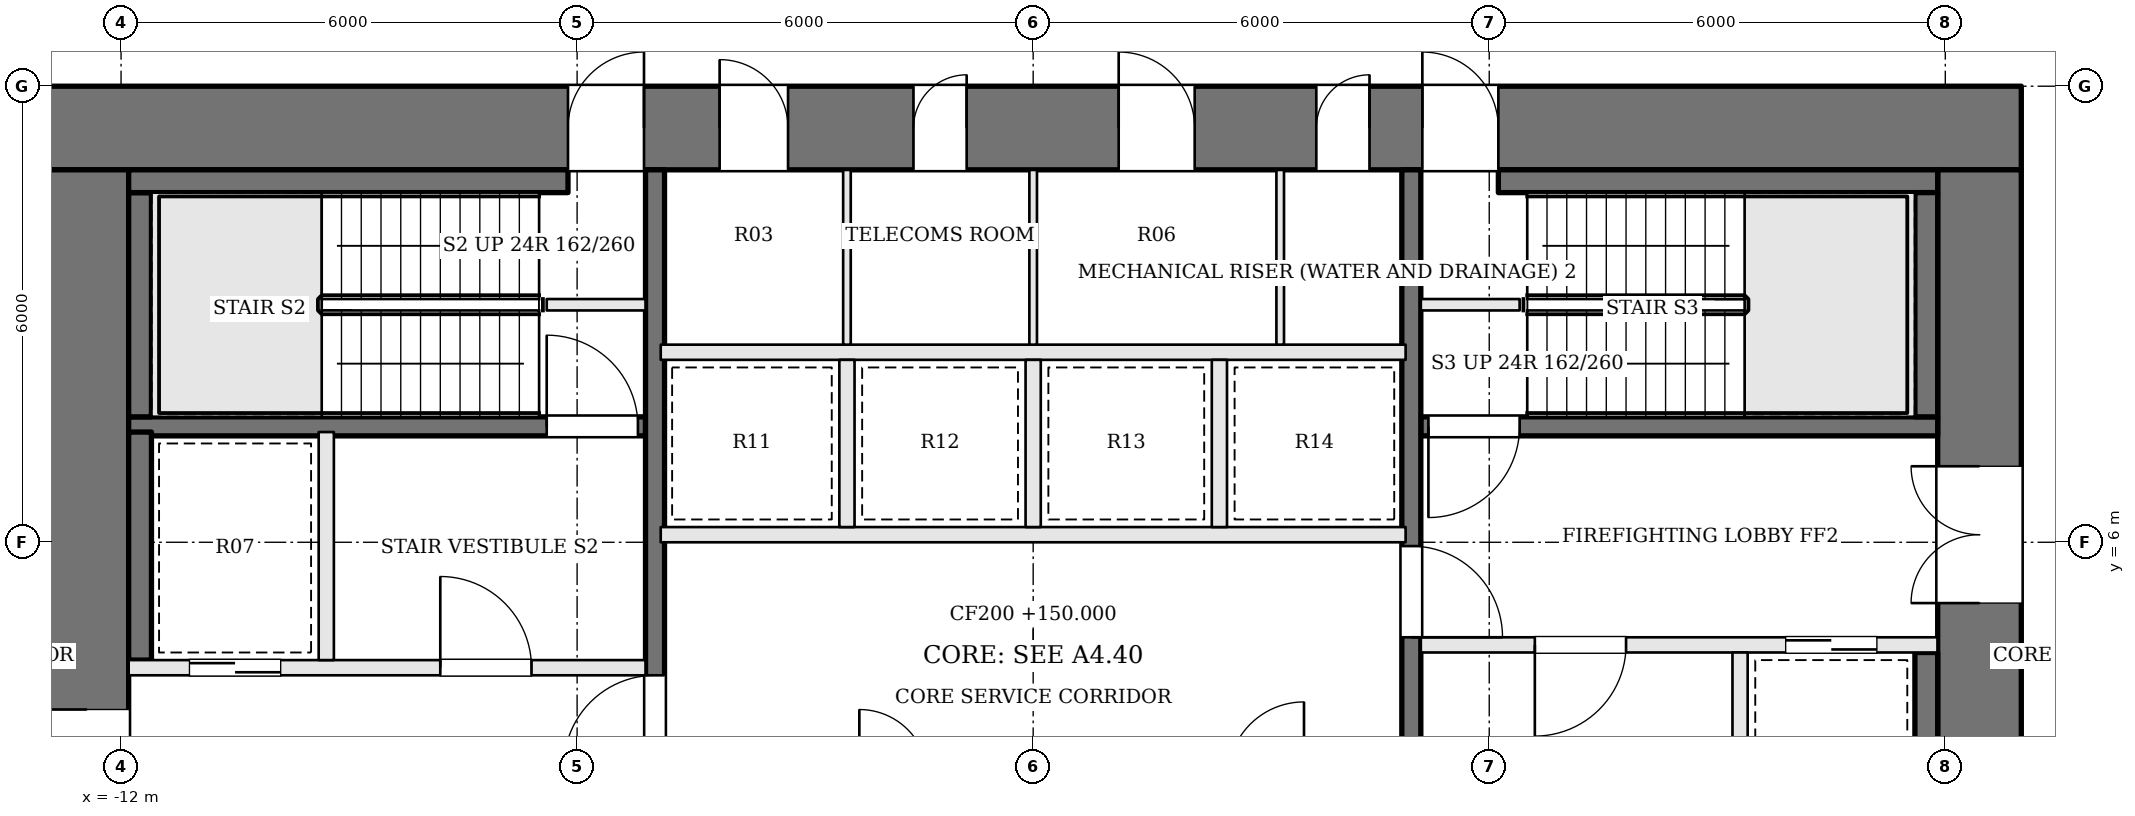
"""IFC4 building model, lengths in metres.
Left out: names, types, materials, properties, quantities, classifications, styles, units other than length and angle.
Written with IfcOpenShell. Run it as: python <this file> out.ifc"""

import sys

from ifc_helpers import new_model, si_unit, direction, frame, frame_2d, origin, place, context, subcontext, project, spatial, rectangle, extrude, element, fill, save


model = new_model("IFC4")
c1 = context("Model", 3, precision=1e-05, world=origin(), true_north=direction((0.0, 1.0)))
c2 = subcontext(c1, "Body", "Model", "MODEL_VIEW")
j1 = project(units=[si_unit("LENGTHUNIT", "METRE"), si_unit("PLANEANGLEUNIT", "RADIAN")], contexts=[c1])
p1 = place(None, origin())
s1 = spatial("IfcSite", under=j1, at=p1, CompositionType="ELEMENT")
p2 = place(p1, origin())
s2 = spatial("IfcBuilding", under=s1, at=p2, CompositionType="ELEMENT")
p3 = place(p2, frame((0.0, 0.0, 150.0)))
s3 = spatial("IfcBuildingStorey", under=s2, at=p3, CompositionType="ELEMENT", Elevation=150.0)
p4 = place(p3, frame((-13.0, 11.45, 0.0), z_axis=(0.0, 0.0, 1.0), x_axis=(1.0, 0.0, 0.0)))
e1 = element("IfcWall", 1, at=p4, inside=s3, PredefinedType="SHEAR", context=c2, shape_type="SweptSolid", body=[
    extrude(rectangle(XDim=26.0, YDim=1.1, at=frame_2d((13.0, 0.0))), origin(), (0.0, 0.0, 1.0), 3.9),
])
p5 = place(p4, frame((8.875, 0.0, 0.0)))
e2 = element("IfcOpeningElement", 2, at=p5, cuts=e1, PredefinedType="OPENING", context=c2, shape_type="SweptSolid", body=[
    extrude(rectangle(XDim=0.9, YDim=2.1, at=frame_2d((0.45, 1.05))), frame((0.0, 0.56, 0.0), z_axis=(0.0, -1.0, 0.0), x_axis=(1.0, 0.0, 0.0)), (0.0, 0.0, 1.0), 1.12),
])
p6 = place(p4, frame((11.425, 0.0, 0.0)))
e3 = element("IfcOpeningElement", 3, at=p6, cuts=e1, PredefinedType="OPENING", context=c2, shape_type="SweptSolid", body=[
    extrude(rectangle(XDim=0.7, YDim=2.1, at=frame_2d((0.35, 1.05))), frame((0.0, 0.56, 0.0), z_axis=(0.0, -1.0, 0.0), x_axis=(1.0, 0.0, 0.0)), (0.0, 0.0, 1.0), 1.12),
])
p7 = place(p4, frame((14.125, 0.0, 0.0)))
e4 = element("IfcOpeningElement", 4, at=p7, cuts=e1, PredefinedType="OPENING", context=c2, shape_type="SweptSolid", body=[
    extrude(rectangle(XDim=1.0, YDim=2.1, at=frame_2d((0.5, 1.05))), frame((0.0, 0.56, 0.0), z_axis=(0.0, -1.0, 0.0), x_axis=(1.0, 0.0, 0.0)), (0.0, 0.0, 1.0), 1.12),
])
p8 = place(p4, frame((16.725, 0.0, 0.0)))
e5 = element("IfcOpeningElement", 5, at=p8, cuts=e1, PredefinedType="OPENING", context=c2, shape_type="SweptSolid", body=[
    extrude(rectangle(XDim=0.7, YDim=2.1, at=frame_2d((0.35, 1.05))), frame((0.0, 0.56, 0.0), z_axis=(0.0, -1.0, 0.0), x_axis=(1.0, 0.0, 0.0)), (0.0, 0.0, 1.0), 1.12),
])
p9 = place(p4, frame((6.88, 0.0, 0.0)))
e6 = element("IfcOpeningElement", 6, at=p9, cuts=e1, PredefinedType="OPENING", context=c2, shape_type="SweptSolid", body=[
    extrude(rectangle(XDim=1.0, YDim=2.1, at=frame_2d((0.5, 1.05))), frame((0.0, 0.56, 0.0), z_axis=(0.0, -1.0, 0.0), x_axis=(1.0, 0.0, 0.0)), (0.0, 0.0, 1.0), 1.12),
])
p10 = place(p4, frame((18.12, 0.0, 0.0)))
e7 = element("IfcOpeningElement", 7, at=p10, cuts=e1, PredefinedType="OPENING", context=c2, shape_type="SweptSolid", body=[
    extrude(rectangle(XDim=1.0, YDim=2.1, at=frame_2d((0.5, 1.05))), frame((0.0, 0.56, 0.0), z_axis=(0.0, -1.0, 0.0), x_axis=(1.0, 0.0, 0.0)), (0.0, 0.0, 1.0), 1.12),
])
p11 = place(p3, frame((12.45, -1.9, 0.0), z_axis=(0.0, 0.0, 1.0), x_axis=(0.0, 1.0, 0.0)))
e8 = element("IfcWall", 8, at=p11, inside=s3, PredefinedType="SHEAR", context=c2, shape_type="SweptSolid", body=[
    extrude(rectangle(XDim=12.8, YDim=1.1, at=frame_2d((6.4, 0.0))), origin(), (0.0, 0.0, 1.0), 3.9),
])
p12 = place(p11, frame((7.1, 0.0, 0.0)))
e9 = element("IfcOpeningElement", 9, at=p12, cuts=e8, PredefinedType="OPENING", context=c2, shape_type="SweptSolid", body=[
    extrude(rectangle(XDim=1.8, YDim=2.1, at=frame_2d((0.9, 1.05))), frame((0.0, 0.56, 0.0), z_axis=(0.0, -1.0, 0.0), x_axis=(1.0, 0.0, 0.0)), (0.0, 0.0, 1.0), 1.12),
])
p13 = place(p3, frame((-12.45, -1.9, 0.0), z_axis=(0.0, 0.0, 1.0), x_axis=(0.0, 1.0, 0.0)))
e10 = element("IfcWall", 10, at=p13, inside=s3, PredefinedType="SHEAR", context=c2, shape_type="SweptSolid", body=[
    extrude(rectangle(XDim=12.8, YDim=1.1, at=frame_2d((6.4, 0.0))), origin(), (0.0, 0.0, 1.0), 3.9),
])
p14 = place(p13, frame((3.9, 0.0, 0.0)))
e11 = element("IfcOpeningElement", 11, at=p14, cuts=e10, PredefinedType="OPENING", context=c2, shape_type="SweptSolid", body=[
    extrude(rectangle(XDim=1.8, YDim=2.1, at=frame_2d((0.9, 1.05))), frame((0.0, 0.56, 0.0), z_axis=(0.0, -1.0, 0.0), x_axis=(1.0, 0.0, 0.0)), (0.0, 0.0, 1.0), 1.12),
])
for number, where, z_axis, x_axis in (
    (12, (6.4, 9.125, 0.0), (0.0, 0.0, 1.0), (-1.0, 0.0, 0.0)),
    (13, (-6.4, 9.125, 0.0), (0.0, 0.0, 1.0), (1.0, 0.0, 0.0)),
):
    element("IfcWall", number, at=place(p3, frame(where, z_axis=z_axis, x_axis=x_axis)), inside=s3, PredefinedType="SOLIDWALL", context=c2, shape_type="SweptSolid", body=[
        extrude(rectangle(XDim=1.3, YDim=0.15, at=frame_2d((0.65, 0.0))), origin(), (0.0, 0.0, 1.0), 3.7),
    ])
p15 = place(p3, frame((11.9, 7.525, 0.0), z_axis=(0.0, 0.0, 1.0), x_axis=(-1.0, 0.0, 0.0)))
e14 = element("IfcWall", 14, at=p15, inside=s3, PredefinedType="SOLIDWALL", context=c2, shape_type="SweptSolid", body=[
    extrude(rectangle(XDim=6.8, YDim=0.25, at=frame_2d((3.4, 0.0))), origin(), (0.0, 0.0, 1.0), 3.7),
])
p16 = place(p15, frame((5.5, 0.0, 0.0)))
e15 = element("IfcOpeningElement", 15, at=p16, cuts=e14, PredefinedType="OPENING", context=c2, shape_type="SweptSolid", body=[
    extrude(rectangle(XDim=1.2, YDim=2.1, at=frame_2d((0.6, 1.05))), frame((0.0, 0.135, 0.0), z_axis=(0.0, -1.0, 0.0), x_axis=(1.0, 0.0, 0.0)), (0.0, 0.0, 1.0), 0.27),
])
p17 = place(p3, frame((-11.9, 4.35, 0.0), z_axis=(0.0, 0.0, 1.0), x_axis=(1.0, 0.0, 0.0)))
e16 = element("IfcWall", 16, at=p17, inside=s3, PredefinedType="SOLIDWALL", context=c2, shape_type="SweptSolid", body=[
    extrude(rectangle(XDim=6.8, YDim=0.2, at=frame_2d((3.4, 0.0))), origin(), (0.0, 0.0, 1.0), 3.7),
])
p18 = place(p17, frame((4.1, 0.0, 0.0)))
e17 = element("IfcOpeningElement", 17, at=p18, cuts=e16, PredefinedType="OPENING", context=c2, shape_type="SweptSolid", body=[
    extrude(rectangle(XDim=1.2, YDim=2.1, at=frame_2d((0.6, 1.05))), frame((0.0, 0.11, 0.0), z_axis=(0.0, -1.0, 0.0), x_axis=(1.0, 0.0, 0.0)), (0.0, 0.0, 1.0), 0.22),
])
p19 = place(p17, frame((0.8, 0.0, 0.0)))
e18 = element("IfcOpeningElement", 18, at=p19, cuts=e16, PredefinedType="OPENING", context=c2, shape_type="SweptSolid", body=[
    extrude(rectangle(XDim=1.2, YDim=2.1, at=frame_2d((0.6, 1.05))), frame((0.0, 0.11, 0.0), z_axis=(0.0, -1.0, 0.0), x_axis=(1.0, 0.0, 0.0)), (0.0, 0.0, 1.0), 0.22),
])
p20 = place(p3, frame((11.9, 4.65, 0.0), z_axis=(0.0, 0.0, 1.0), x_axis=(-1.0, 0.0, 0.0)))
e19 = element("IfcWall", 19, at=p20, inside=s3, PredefinedType="SOLIDWALL", context=c2, shape_type="SweptSolid", body=[
    extrude(rectangle(XDim=6.8, YDim=0.2, at=frame_2d((3.4, 0.0))), origin(), (0.0, 0.0, 1.0), 3.7),
])
p21 = place(p20, frame((4.1, 0.0, 0.0)))
e20 = element("IfcOpeningElement", 20, at=p21, cuts=e19, PredefinedType="OPENING", context=c2, shape_type="SweptSolid", body=[
    extrude(rectangle(XDim=1.2, YDim=2.1, at=frame_2d((0.6, 1.05))), frame((0.0, 0.11, 0.0), z_axis=(0.0, -1.0, 0.0), x_axis=(1.0, 0.0, 0.0)), (0.0, 0.0, 1.0), 0.22),
])
p22 = place(p20, frame((0.8, 0.0, 0.0)))
e21 = element("IfcOpeningElement", 21, at=p22, cuts=e19, PredefinedType="OPENING", context=c2, shape_type="SweptSolid", body=[
    extrude(rectangle(XDim=1.2, YDim=2.1, at=frame_2d((0.6, 1.05))), frame((0.0, 0.11, 0.0), z_axis=(0.0, -1.0, 0.0), x_axis=(1.0, 0.0, 0.0)), (0.0, 0.0, 1.0), 0.22),
])
p23 = place(p3, frame((-11.9, 7.525, 0.0), z_axis=(0.0, 0.0, 1.0), x_axis=(1.0, 0.0, 0.0)))
e22 = element("IfcWall", 22, at=p23, inside=s3, PredefinedType="SOLIDWALL", context=c2, shape_type="SweptSolid", body=[
    extrude(rectangle(XDim=6.8, YDim=0.25, at=frame_2d((3.4, 0.0))), origin(), (0.0, 0.0, 1.0), 3.7),
])
p24 = place(p23, frame((5.5, 0.0, 0.0)))
e23 = element("IfcOpeningElement", 23, at=p24, cuts=e22, PredefinedType="OPENING", context=c2, shape_type="SweptSolid", body=[
    extrude(rectangle(XDim=1.2, YDim=2.1, at=frame_2d((0.6, 1.05))), frame((0.0, 0.135, 0.0), z_axis=(0.0, -1.0, 0.0), x_axis=(1.0, 0.0, 0.0)), (0.0, 0.0, 1.0), 0.27),
])
for number, where, z_axis, x_axis in (
    (24, (-9.3, 4.45, 0.0), (0.0, 0.0, 1.0), (0.0, 1.0, 0.0)),
    (25, (9.3, 4.55, 0.0), (0.0, 0.0, 1.0), (0.0, -1.0, 0.0)),
):
    element("IfcWall", number, at=place(p3, frame(where, z_axis=z_axis, x_axis=x_axis)), inside=s3, PredefinedType="SOLIDWALL", context=c2, shape_type="SweptSolid", body=[
        extrude(rectangle(XDim=3.0, YDim=0.2, at=frame_2d((1.5, 0.0))), origin(), (0.0, 0.0, 1.0), 3.7),
    ])
p25 = place(p3, frame((-4.975, -1.9, 0.0), z_axis=(0.0, 0.0, 1.0), x_axis=(0.0, 1.0, 0.0)))
e26 = element("IfcWall", 26, at=p25, inside=s3, PredefinedType="SOLIDWALL", context=c2, shape_type="SweptSolid", body=[
    extrude(rectangle(XDim=12.8, YDim=0.25, at=frame_2d((6.4, 0.0))), origin(), (0.0, 0.0, 1.0), 3.7),
])
p26 = place(p25, frame((4.95, 0.0, 0.0)))
e27 = element("IfcOpeningElement", 27, at=p26, cuts=e26, PredefinedType="OPENING", context=c2, shape_type="SweptSolid", body=[
    extrude(rectangle(XDim=1.2, YDim=2.1, at=frame_2d((0.6, 1.05))), frame((0.0, 0.135, 0.0), z_axis=(0.0, -1.0, 0.0), x_axis=(1.0, 0.0, 0.0)), (0.0, 0.0, 1.0), 0.27),
])
p27 = place(p3, frame((4.975, 10.9, 0.0), z_axis=(0.0, 0.0, 1.0), x_axis=(0.0, -1.0, 0.0)))
e28 = element("IfcWall", 28, at=p27, inside=s3, PredefinedType="SOLIDWALL", context=c2, shape_type="SweptSolid", body=[
    extrude(rectangle(XDim=12.8, YDim=0.25, at=frame_2d((6.4, 0.0))), origin(), (0.0, 0.0, 1.0), 3.7),
])
p28 = place(p27, frame((4.95, 0.0, 0.0)))
e29 = element("IfcOpeningElement", 29, at=p28, cuts=e28, PredefinedType="OPENING", context=c2, shape_type="SweptSolid", body=[
    extrude(rectangle(XDim=1.2, YDim=2.1, at=frame_2d((0.6, 1.05))), frame((0.0, 0.135, 0.0), z_axis=(0.0, -1.0, 0.0), x_axis=(1.0, 0.0, 0.0)), (0.0, 0.0, 1.0), 0.27),
])
p29 = place(p3, frame((-11.75, 4.45, 0.0), z_axis=(0.0, 0.0, 1.0), x_axis=(0.0, 1.0, 0.0)))
e30 = element("IfcWall", 30, at=p29, inside=s3, PredefinedType="SOLIDWALL", context=c2, shape_type="SweptSolid", body=[
    extrude(rectangle(XDim=3.0, YDim=0.3, at=frame_2d((1.5, 0.0))), origin(), (0.0, 0.0, 1.0), 3.7),
])
p30 = place(p3, frame((-11.75, 7.65, 0.0), z_axis=(0.0, 0.0, 1.0), x_axis=(0.0, 1.0, 0.0)))
e31 = element("IfcWall", 31, at=p30, inside=s3, PredefinedType="SOLIDWALL", context=c2, shape_type="SweptSolid", body=[
    extrude(rectangle(XDim=2.95, YDim=0.3, at=frame_2d((1.475, 0.0))), origin(), (0.0, 0.0, 1.0), 3.7),
])
for number, where, z_axis, x_axis in (
    (32, (-11.9, 10.75, 0.0), (0.0, 0.0, 1.0), (1.0, 0.0, 0.0)),
    (33, (11.9, 10.75, 0.0), (0.0, 0.0, 1.0), (-1.0, 0.0, 0.0)),
):
    element("IfcWall", number, at=place(p3, frame(where, z_axis=z_axis, x_axis=x_axis)), inside=s3, PredefinedType="SOLIDWALL", context=c2, shape_type="SweptSolid", body=[
        extrude(rectangle(XDim=5.78, YDim=0.3, at=frame_2d((2.89, 0.0))), origin(), (0.0, 0.0, 1.0), 3.7),
    ])
p31 = place(p3, frame((11.75, 10.6, 0.0), z_axis=(0.0, 0.0, 1.0), x_axis=(0.0, -1.0, 0.0)))
e34 = element("IfcWall", 34, at=p31, inside=s3, PredefinedType="SOLIDWALL", context=c2, shape_type="SweptSolid", body=[
    extrude(rectangle(XDim=2.95, YDim=0.3, at=frame_2d((1.475, 0.0))), origin(), (0.0, 0.0, 1.0), 3.7),
])
p32 = place(p3, frame((11.75, 4.55, 0.0), z_axis=(0.0, 0.0, 1.0), x_axis=(0.0, -1.0, 0.0)))
e35 = element("IfcWall", 35, at=p32, inside=s3, PredefinedType="SOLIDWALL", context=c2, shape_type="SweptSolid", body=[
    extrude(rectangle(XDim=3.0, YDim=0.3, at=frame_2d((1.5, 0.0))), origin(), (0.0, 0.0, 1.0), 3.7),
])
for number, where, z_axis, x_axis in (
    (36, (-4.9, 6.1, 0.0), (0.0, 0.0, 1.0), (1.0, 0.0, 0.0)),
    (37, (-4.9, 8.5, 0.0), (0.0, 0.0, 1.0), (1.0, 0.0, 0.0)),
):
    element("IfcWall", number, at=place(p3, frame(where, z_axis=z_axis, x_axis=x_axis)), inside=s3, PredefinedType="SOLIDWALL", context=c2, shape_type="SweptSolid", body=[
        extrude(rectangle(XDim=9.8, YDim=0.2, at=frame_2d((4.9, 0.0))), origin(), (0.0, 0.0, 1.0), 3.7),
    ])
for number, where, z_axis, x_axis in (
    (38, (-2.45, 6.2, 0.0), (0.0, 0.0, 1.0), (0.0, 1.0, 0.0)),
    (39, (0.0, 6.2, 0.0), (0.0, 0.0, 1.0), (0.0, 1.0, 0.0)),
    (40, (2.45, 6.2, 0.0), (0.0, 0.0, 1.0), (0.0, 1.0, 0.0)),
):
    element("IfcWall", number, at=place(p3, frame(where, z_axis=z_axis, x_axis=x_axis)), inside=s3, PredefinedType="SOLIDWALL", context=c2, shape_type="SweptSolid", body=[
        extrude(rectangle(XDim=2.2, YDim=0.2, at=frame_2d((1.1, 0.0))), origin(), (0.0, 0.0, 1.0), 3.7),
    ])
for number, where, z_axis, x_axis in (
    (41, (-2.45, 8.6, 0.0), (0.0, 0.0, 1.0), (0.0, 1.0, 0.0)),
    (42, (0.0, 8.6, 0.0), (0.0, 0.0, 1.0), (0.0, 1.0, 0.0)),
    (43, (3.25, 8.6, 0.0), (0.0, 0.0, 1.0), (0.0, 1.0, 0.0)),
):
    element("IfcWall", number, at=place(p3, frame(where, z_axis=z_axis, x_axis=x_axis)), inside=s3, PredefinedType="PARTITIONING", context=c2, shape_type="SweptSolid", body=[
        extrude(rectangle(XDim=2.3, YDim=0.1, at=frame_2d((1.15, 0.0))), origin(), (0.0, 0.0, 1.0), 3.7),
    ])
p33 = place(p14, origin())
e44 = element("IfcDoor", 44, at=p33, inside=s3, OperationType="DOUBLE_DOOR_SINGLE_SWING", PredefinedType="DOOR", context=c2, shape_type="SweptSolid", body=[
    extrude(rectangle(XDim=1.8, YDim=2.1, at=frame_2d((0.9, 1.05))), frame((0.0, 0.025, 0.0), z_axis=(0.0, -1.0, 0.0), x_axis=(1.0, 0.0, 0.0)), (0.0, 0.0, 1.0), 0.05),
])
fill(e11, e44)
p34 = place(p12, origin())
e45 = element("IfcDoor", 45, at=p34, inside=s3, OperationType="DOUBLE_DOOR_SINGLE_SWING", PredefinedType="DOOR", context=c2, shape_type="SweptSolid", body=[
    extrude(rectangle(XDim=1.8, YDim=2.1, at=frame_2d((0.9, 1.05))), frame((0.0, 0.025, 0.0), z_axis=(0.0, -1.0, 0.0), x_axis=(1.0, 0.0, 0.0)), (0.0, 0.0, 1.0), 0.05),
])
fill(e9, e45)
p35 = place(p26, origin())
e46 = element("IfcDoor", 46, at=p35, inside=s3, OperationType="SINGLE_SWING_LEFT", PredefinedType="DOOR", context=c2, shape_type="SweptSolid", body=[
    extrude(rectangle(XDim=1.2, YDim=2.1, at=frame_2d((0.6, 1.05))), frame((0.0, 0.025, 0.0), z_axis=(0.0, -1.0, 0.0), x_axis=(1.0, 0.0, 0.0)), (0.0, 0.0, 1.0), 0.05),
])
fill(e27, e46)
p36 = place(p28, origin())
e47 = element("IfcDoor", 47, at=p36, inside=s3, OperationType="SINGLE_SWING_RIGHT", PredefinedType="DOOR", context=c2, shape_type="SweptSolid", body=[
    extrude(rectangle(XDim=1.2, YDim=2.1, at=frame_2d((0.6, 1.05))), frame((0.0, 0.025, 0.0), z_axis=(0.0, -1.0, 0.0), x_axis=(1.0, 0.0, 0.0)), (0.0, 0.0, 1.0), 0.05),
])
fill(e29, e47)
p37 = place(p18, origin())
e48 = element("IfcDoor", 48, at=p37, inside=s3, OperationType="SINGLE_SWING_LEFT", PredefinedType="DOOR", context=c2, shape_type="SweptSolid", body=[
    extrude(rectangle(XDim=1.2, YDim=2.1, at=frame_2d((0.6, 1.05))), frame((0.0, 0.025, 0.0), z_axis=(0.0, -1.0, 0.0), x_axis=(1.0, 0.0, 0.0)), (0.0, 0.0, 1.0), 0.05),
])
fill(e17, e48)
p38 = place(p21, origin())
e49 = element("IfcDoor", 49, at=p38, inside=s3, OperationType="SINGLE_SWING_RIGHT", PredefinedType="DOOR", context=c2, shape_type="SweptSolid", body=[
    extrude(rectangle(XDim=1.2, YDim=2.1, at=frame_2d((0.6, 1.05))), frame((0.0, 0.025, 0.0), z_axis=(0.0, -1.0, 0.0), x_axis=(1.0, 0.0, 0.0)), (0.0, 0.0, 1.0), 0.05),
])
fill(e20, e49)
p39 = place(p16, origin())
e50 = element("IfcDoor", 50, at=p39, inside=s3, OperationType="SINGLE_SWING_RIGHT", PredefinedType="DOOR", context=c2, shape_type="SweptSolid", body=[
    extrude(rectangle(XDim=1.2, YDim=2.1, at=frame_2d((0.6, 1.05))), frame((0.0, 0.025, 0.0), z_axis=(0.0, -1.0, 0.0), x_axis=(1.0, 0.0, 0.0)), (0.0, 0.0, 1.0), 0.05),
])
fill(e15, e50)
p40 = place(p24, origin())
e51 = element("IfcDoor", 51, at=p40, inside=s3, OperationType="SINGLE_SWING_LEFT", PredefinedType="DOOR", context=c2, shape_type="SweptSolid", body=[
    extrude(rectangle(XDim=1.2, YDim=2.1, at=frame_2d((0.6, 1.05))), frame((0.0, 0.025, 0.0), z_axis=(0.0, -1.0, 0.0), x_axis=(1.0, 0.0, 0.0)), (0.0, 0.0, 1.0), 0.05),
])
fill(e23, e51)
p41 = place(p19, origin())
e52 = element("IfcDoor", 52, at=p41, inside=s3, OperationType="SLIDING_TO_RIGHT", PredefinedType="DOOR", context=c2, shape_type="SweptSolid", body=[
    extrude(rectangle(XDim=1.2, YDim=2.1, at=frame_2d((0.6, 1.05))), frame((0.0, 0.025, 0.0), z_axis=(0.0, -1.0, 0.0), x_axis=(1.0, 0.0, 0.0)), (0.0, 0.0, 1.0), 0.05),
])
fill(e18, e52)
p42 = place(p22, origin())
e53 = element("IfcDoor", 53, at=p42, inside=s3, OperationType="SLIDING_TO_RIGHT", PredefinedType="DOOR", context=c2, shape_type="SweptSolid", body=[
    extrude(rectangle(XDim=1.2, YDim=2.1, at=frame_2d((0.6, 1.05))), frame((0.0, 0.025, 0.0), z_axis=(0.0, -1.0, 0.0), x_axis=(1.0, 0.0, 0.0)), (0.0, 0.0, 1.0), 0.05),
])
fill(e21, e53)
p43 = place(p5, origin())
e54 = element("IfcDoor", 54, at=p43, inside=s3, OperationType="SINGLE_SWING_LEFT", PredefinedType="DOOR", context=c2, shape_type="SweptSolid", body=[
    extrude(rectangle(XDim=0.9, YDim=2.1, at=frame_2d((0.45, 1.05))), frame((0.0, 0.025, 0.0), z_axis=(0.0, -1.0, 0.0), x_axis=(1.0, 0.0, 0.0)), (0.0, 0.0, 1.0), 0.05),
])
fill(e2, e54)
p44 = place(p6, origin())
e55 = element("IfcDoor", 55, at=p44, inside=s3, OperationType="SINGLE_SWING_RIGHT", PredefinedType="DOOR", context=c2, shape_type="SweptSolid", body=[
    extrude(rectangle(XDim=0.7, YDim=2.1, at=frame_2d((0.35, 1.05))), frame((0.0, 0.025, 0.0), z_axis=(0.0, -1.0, 0.0), x_axis=(1.0, 0.0, 0.0)), (0.0, 0.0, 1.0), 0.05),
])
fill(e3, e55)
p45 = place(p7, origin())
e56 = element("IfcDoor", 56, at=p45, inside=s3, OperationType="SINGLE_SWING_LEFT", PredefinedType="DOOR", context=c2, shape_type="SweptSolid", body=[
    extrude(rectangle(XDim=1.0, YDim=2.1, at=frame_2d((0.5, 1.05))), frame((0.0, 0.025, 0.0), z_axis=(0.0, -1.0, 0.0), x_axis=(1.0, 0.0, 0.0)), (0.0, 0.0, 1.0), 0.05),
])
fill(e4, e56)
p46 = place(p8, origin())
e57 = element("IfcDoor", 57, at=p46, inside=s3, OperationType="SINGLE_SWING_RIGHT", PredefinedType="DOOR", context=c2, shape_type="SweptSolid", body=[
    extrude(rectangle(XDim=0.7, YDim=2.1, at=frame_2d((0.35, 1.05))), frame((0.0, 0.025, 0.0), z_axis=(0.0, -1.0, 0.0), x_axis=(1.0, 0.0, 0.0)), (0.0, 0.0, 1.0), 0.05),
])
fill(e5, e57)
p47 = place(p9, origin())
e58 = element("IfcDoor", 58, at=p47, inside=s3, OperationType="SINGLE_SWING_RIGHT", PredefinedType="DOOR", context=c2, shape_type="SweptSolid", body=[
    extrude(rectangle(XDim=1.0, YDim=2.1, at=frame_2d((0.5, 1.05))), frame((0.0, 0.025, 0.0), z_axis=(0.0, -1.0, 0.0), x_axis=(1.0, 0.0, 0.0)), (0.0, 0.0, 1.0), 0.05),
])
fill(e6, e58)
p48 = place(p10, origin())
e59 = element("IfcDoor", 59, at=p48, inside=s3, OperationType="SINGLE_SWING_LEFT", PredefinedType="DOOR", context=c2, shape_type="SweptSolid", body=[
    extrude(rectangle(XDim=1.0, YDim=2.1, at=frame_2d((0.5, 1.05))), frame((0.0, 0.025, 0.0), z_axis=(0.0, -1.0, 0.0), x_axis=(1.0, 0.0, 0.0)), (0.0, 0.0, 1.0), 0.05),
])
fill(e7, e59)
save(model, sys.argv[1])
